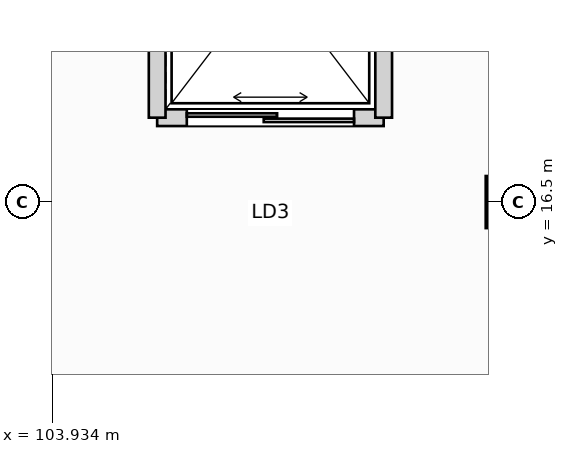
"""IFC4 building model, lengths in metres.
Left out: names, types, materials, properties, quantities, classifications, styles, units other than length and angle.
Written with IfcOpenShell. Run it as: python <this file> out.ifc"""

import sys

from ifc_helpers import new_model, si_unit, direction, frame, frame_2d, origin, origin_2d, place, context, subcontext, project, spatial, rectangle, i_section, extrude, element, fill, save


model = new_model("IFC4")
c1 = context("Model", 3, precision=1e-05, world=origin(), true_north=direction((0.0, 1.0)))
c2 = subcontext(c1, "Body", "Model", "MODEL_VIEW")
j1 = project(units=[si_unit("LENGTHUNIT", "METRE"), si_unit("PLANEANGLEUNIT", "RADIAN")], contexts=[c1])
p1 = place(None, origin())
s1 = spatial("IfcSite", under=j1, at=p1, CompositionType="ELEMENT")
p2 = place(p1, origin())
s2 = spatial("IfcBuilding", under=s1, at=p2, CompositionType="ELEMENT")
p3 = place(p2, origin())
s3 = spatial("IfcBuildingStorey", under=s2, at=p3, CompositionType="ELEMENT", Elevation=0.0)
p4 = place(p3, frame((109.8, 16.5, 0.0), z_axis=(0.0, 0.0, 1.0), x_axis=(1.0, 0.0, 0.0)))
e1 = element("IfcColumn", 1, at=p4, inside=s3, PredefinedType="COLUMN", context=c2, shape_type="SweptSolid", body=[
    extrude(i_section(OverallWidth=0.3, OverallDepth=0.65, WebThickness=0.016, FlangeThickness=0.031, at=origin_2d()), origin(), (0.0, 0.0, 1.0), 6.0),
])
p5 = place(p3, frame((105.31, 17.61, 0.0), z_axis=(0.0, 0.0, 1.0), x_axis=(1.0, 0.0, 0.0)))
e2 = element("IfcWall", 2, at=p5, inside=s3, PredefinedType="PARTITIONING", context=c2, shape_type="SweptSolid", body=[
    extrude(rectangle(XDim=2.98, YDim=0.22, at=frame_2d((1.49, 0.0))), origin(), (0.0, 0.0, 1.0), 5.665),
])
p6 = place(p5, frame((0.39, 0.0, 0.0)))
e3 = element("IfcOpeningElement", 3, at=p6, cuts=e2, PredefinedType="OPENING", context=c2, shape_type="SweptSolid", body=[
    extrude(rectangle(XDim=2.2, YDim=2.5, at=frame_2d((1.1, 1.25))), frame((0.0, 0.12, 0.0), z_axis=(0.0, -1.0, 0.0), x_axis=(1.0, 0.0, 0.0)), (0.0, 0.0, 1.0), 0.24),
])
for number, where, z_axis, x_axis in (
    (4, (105.31, 17.61, 0.0), (0.0, 0.0, 1.0), (0.0, 1.0, 0.0)),
    (5, (108.29, 17.61, 0.0), (0.0, 0.0, 1.0), (0.0, 1.0, 0.0)),
):
    element("IfcWall", number, at=place(p3, frame(where, z_axis=z_axis, x_axis=x_axis)), inside=s3, PredefinedType="PARTITIONING", context=c2, shape_type="SweptSolid", body=[
        extrude(rectangle(XDim=3.78, YDim=0.22, at=frame_2d((1.89, 0.0))), origin(), (0.0, 0.0, 1.0), 5.665),
    ])
p7 = place(p6, origin())
e6 = element("IfcDoor", 6, at=p7, inside=s3, OperationType="DOUBLE_DOOR_SLIDING", PredefinedType="DOOR", context=c2, shape_type="SweptSolid", body=[
    extrude(rectangle(XDim=2.2, YDim=2.5, at=frame_2d((1.1, 1.25))), frame((0.0, 0.025, 0.0), z_axis=(0.0, -1.0, 0.0), x_axis=(1.0, 0.0, 0.0)), (0.0, 0.0, 1.0), 0.05),
])
fill(e3, e6)
save(model, sys.argv[1])
